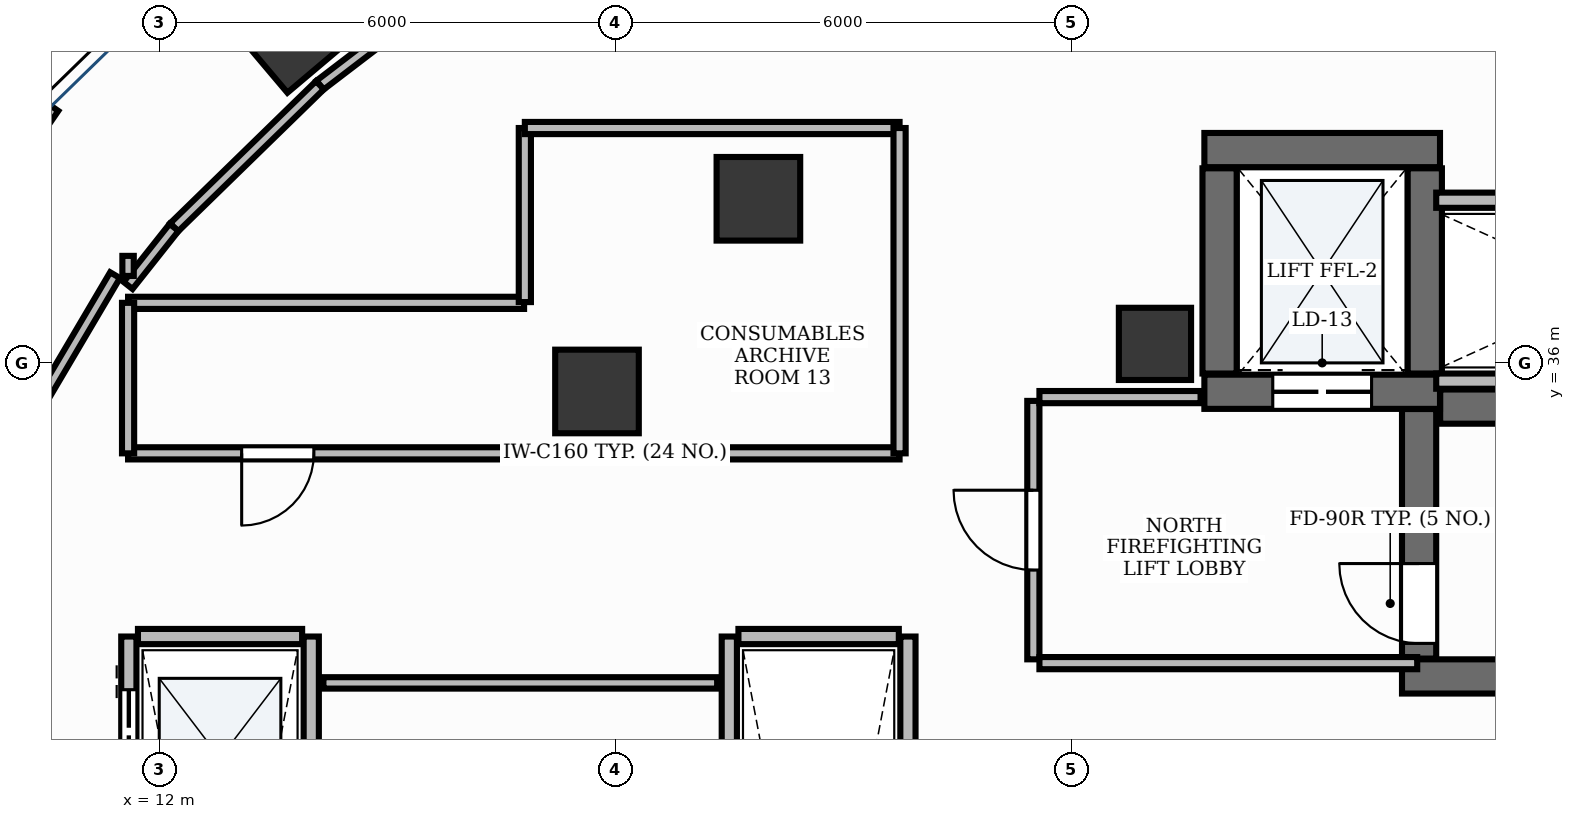
"""IFC4 building model, lengths in metres.
Left out: names, types, materials, properties, quantities, classifications, styles, units other than length and angle.
Written with IfcOpenShell. Run it as: python <this file> out.ifc"""

import sys

from ifc_helpers import new_model, si_unit, direction, frame, frame_2d, origin, origin_2d, place, context, subcontext, project, spatial, rectangle, extrude, element, fill, save


model = new_model("IFC4")
c1 = context("Model", 3, precision=1e-05, world=origin(), true_north=direction((0.0, 1.0)))
c2 = subcontext(c1, "Body", "Model", "MODEL_VIEW")
j1 = project(units=[si_unit("LENGTHUNIT", "METRE"), si_unit("PLANEANGLEUNIT", "RADIAN")], contexts=[c1])
p1 = place(None, origin())
s1 = spatial("IfcSite", under=j1, at=p1, CompositionType="ELEMENT")
p2 = place(p1, origin())
s2 = spatial("IfcBuilding", under=s1, at=p2, CompositionType="ELEMENT")
p3 = place(p2, frame((0.0, 0.0, 111.0)))
s3 = spatial("IfcBuildingStorey", under=s2, at=p3, CompositionType="ELEMENT", Elevation=111.0)
p4 = place(p3, frame((28.852, 35.425, 0.0), z_axis=(0.0, 0.0, 1.0), x_axis=(1.0, 0.0, 0.0)))
e1 = element("IfcWall", 1, at=p4, inside=s3, PredefinedType="SHEAR", context=c2, shape_type="SweptSolid", body=[
    extrude(rectangle(XDim=8.248, YDim=0.45, at=frame_2d((4.124, 0.0))), origin(), (0.0, 0.0, 1.0), 3.9),
])
p5 = place(p3, frame((28.35, 31.875, 0.0), z_axis=(0.0, 0.0, 1.0), x_axis=(1.0, 0.0, 0.0)))
e2 = element("IfcWall", 2, at=p5, inside=s3, PredefinedType="SHEAR", context=c2, shape_type="SweptSolid", body=[
    extrude(rectangle(XDim=8.75, YDim=0.45, at=frame_2d((4.375, 0.0))), origin(), (0.0, 0.0, 1.0), 3.9),
])
p6 = place(p3, frame((28.575, 32.11, 0.0), z_axis=(0.0, 0.0, 1.0), x_axis=(0.0, 1.0, 0.0)))
e3 = element("IfcWall", 3, at=p6, inside=s3, PredefinedType="SHEAR", context=c2, shape_type="SweptSolid", body=[
    extrude(rectangle(XDim=3.283, YDim=0.45, at=frame_2d((1.642, 0.0))), origin(), (0.0, 0.0, 1.0), 3.9),
])
p7 = place(p6, frame((0.2, 0.0, 0.0)))
e4 = element("IfcOpeningElement", 4, at=p7, cuts=e3, PredefinedType="OPENING", context=c2, shape_type="SweptSolid", body=[
    extrude(rectangle(XDim=1.05, YDim=2.15, at=frame_2d((0.525, 1.075))), frame((0.0, 0.24, 0.0), z_axis=(0.0, -1.0, 0.0), x_axis=(1.0, 0.0, 0.0)), (0.0, 0.0, 1.0), 0.48),
])
p8 = place(p3, frame((25.75, 38.8, 0.0), z_axis=(0.0, 0.0, 1.0), x_axis=(1.0, 0.0, 0.0)))
e5 = element("IfcWall", 5, at=p8, inside=s3, PredefinedType="SHEAR", context=c2, shape_type="SweptSolid", body=[
    extrude(rectangle(XDim=3.1, YDim=0.45, at=frame_2d((1.55, 0.0))), origin(), (0.0, 0.0, 1.0), 3.9),
])
p9 = place(p3, frame((25.75, 35.62, 0.0), z_axis=(0.0, 0.0, 1.0), x_axis=(1.0, 0.0, 0.0)))
e6 = element("IfcWall", 6, at=p9, inside=s3, PredefinedType="SHEAR", context=c2, shape_type="SweptSolid", body=[
    extrude(rectangle(XDim=3.1, YDim=0.45, at=frame_2d((1.55, 0.0))), origin(), (0.0, 0.0, 1.0), 3.9),
])
p10 = place(p9, frame((0.9, 0.0, 0.0)))
e7 = element("IfcOpeningElement", 7, at=p10, cuts=e6, PredefinedType="OPENING", context=c2, shape_type="SweptSolid", body=[
    extrude(rectangle(XDim=1.3, YDim=2.2, at=frame_2d((0.65, 1.1))), frame((0.0, 0.24, 0.0), z_axis=(0.0, -1.0, 0.0), x_axis=(1.0, 0.0, 0.0)), (0.0, 0.0, 1.0), 0.48),
])
for number, where, z_axis, x_axis in (
    (8, (25.95, 35.86, 0.0), (0.0, 0.0, 1.0), (0.0, 1.0, 0.0)),
    (9, (28.65, 35.86, 0.0), (0.0, 0.0, 1.0), (0.0, 1.0, 0.0)),
):
    element("IfcWall", number, at=place(p3, frame(where, z_axis=z_axis, x_axis=x_axis)), inside=s3, PredefinedType="SHEAR", context=c2, shape_type="SweptSolid", body=[
        extrude(rectangle(XDim=2.7, YDim=0.45, at=frame_2d((1.35, 0.0))), origin(), (0.0, 0.0, 1.0), 3.9),
    ])
p11 = place(p3, frame((25.1, 36.25, -0.0), z_axis=(0.0, 0.0, 1.0), x_axis=(1.0, 0.0, 0.0)))
e10 = element("IfcColumn", 10, at=p11, inside=s3, PredefinedType="PILASTER", context=c2, shape_type="SweptSolid", body=[
    extrude(rectangle(XDim=0.95, YDim=0.95, at=origin_2d()), origin(), (0.0, 0.0, 1.0), 3.901),
])
p12 = place(p3, frame((13.758, 40.4, -0.0), z_axis=(0.0, 0.0, 1.0), x_axis=(0.764246456939, 0.644924300253, 0.0)))
e11 = element("IfcColumn", 11, at=p12, inside=s3, PredefinedType="COLUMN", context=c2, shape_type="SweptSolid", body=[
    extrude(rectangle(XDim=1.2, YDim=1.2, at=origin_2d()), origin(), (0.0, 0.0, 1.0), 3.901),
])
for number, where, z_axis, x_axis in (
    (12, (19.883, 38.159, -0.0), (0.0, 0.0, 1.0), (1.0, 0.0, 0.0)),
    (13, (17.759, 35.624, -0.0), (0.0, 0.0, 1.0), (1.0, 0.0, 0.0)),
):
    element("IfcColumn", number, at=place(p3, frame(where, z_axis=z_axis, x_axis=x_axis)), inside=s3, PredefinedType="COLUMN", context=c2, shape_type="SweptSolid", body=[
        extrude(rectangle(XDim=1.1, YDim=1.1, at=origin_2d()), origin(), (0.0, 0.0, 1.0), 3.901),
    ])
p13 = place(p3, frame((10.548, 39.4, 0.0), z_axis=(0.0, 0.0, 1.0), x_axis=(-0.566825798999, -0.823837674296, 0.0)))
e14 = element("IfcWall", 14, at=p13, inside=s3, PredefinedType="STANDARD", context=c2, shape_type="SweptSolid", body=[
    extrude(rectangle(XDim=5.826, YDim=0.3, at=frame_2d((2.913, 0.0))), origin(), (0.0, 0.0, 1.0), 3.47),
])
p14 = place(p3, frame((11.6, 21.6, 0.0), z_axis=(0.0, 0.0, 1.0), x_axis=(0.0, 1.0, 0.0)))
e15 = element("IfcWall", 15, at=p14, inside=s3, PredefinedType="PARTITIONING", context=c2, shape_type="SweptSolid", body=[
    extrude(rectangle(XDim=10.8, YDim=0.2, at=frame_2d((5.4, 0.0))), origin(), (0.0, 0.0, 1.0), 2.91),
])
p15 = place(p14, frame((0.9, 0.0, 0.0)))
e16 = element("IfcOpeningElement", 16, at=p15, cuts=e15, PredefinedType="OPENING", context=c2, shape_type="SweptSolid", body=[
    extrude(rectangle(XDim=1.1, YDim=2.2, at=frame_2d((0.55, 1.1))), frame((0.0, 0.115, 0.0), z_axis=(0.0, -1.0, 0.0), x_axis=(1.0, 0.0, 0.0)), (0.0, 0.0, 1.0), 0.23),
])
p16 = place(p14, frame((3.6, 0.0, 0.0)))
e17 = element("IfcOpeningElement", 17, at=p16, cuts=e15, PredefinedType="OPENING", context=c2, shape_type="SweptSolid", body=[
    extrude(rectangle(XDim=1.1, YDim=2.2, at=frame_2d((0.55, 1.1))), frame((0.0, 0.115, 0.0), z_axis=(0.0, -1.0, 0.0), x_axis=(1.0, 0.0, 0.0)), (0.0, 0.0, 1.0), 0.23),
])
p17 = place(p14, frame((6.3, 0.0, 0.0)))
e18 = element("IfcOpeningElement", 18, at=p17, cuts=e15, PredefinedType="OPENING", context=c2, shape_type="SweptSolid", body=[
    extrude(rectangle(XDim=1.1, YDim=2.2, at=frame_2d((0.55, 1.1))), frame((0.0, 0.115, 0.0), z_axis=(0.0, -1.0, 0.0), x_axis=(1.0, 0.0, 0.0)), (0.0, 0.0, 1.0), 0.23),
])
p18 = place(p14, frame((9.0, 0.0, 0.0)))
e19 = element("IfcOpeningElement", 19, at=p18, cuts=e15, PredefinedType="OPENING", context=c2, shape_type="SweptSolid", body=[
    extrude(rectangle(XDim=1.1, YDim=2.2, at=frame_2d((0.55, 1.1))), frame((0.0, 0.115, 0.0), z_axis=(0.0, -1.0, 0.0), x_axis=(1.0, 0.0, 0.0)), (0.0, 0.0, 1.0), 0.23),
])
p19 = place(p3, frame((14.0, 21.6, 0.0), z_axis=(0.0, 0.0, 1.0), x_axis=(0.0, 1.0, 0.0)))
e20 = element("IfcWall", 20, at=p19, inside=s3, PredefinedType="PARTITIONING", context=c2, shape_type="SweptSolid", body=[
    extrude(rectangle(XDim=10.8, YDim=0.2, at=frame_2d((5.4, 0.0))), origin(), (0.0, 0.0, 1.0), 2.91),
])
p20 = place(p3, frame((11.72, 32.4, 0.0), z_axis=(0.0, 0.0, 1.0), x_axis=(1.0, 0.0, 0.0)))
e21 = element("IfcWall", 21, at=p20, inside=s3, PredefinedType="PARTITIONING", context=c2, shape_type="SweptSolid", body=[
    extrude(rectangle(XDim=2.16, YDim=0.2, at=frame_2d((1.08, 0.0))), origin(), (0.0, 0.0, 1.0), 2.91),
])
for number, where, z_axis, x_axis in (
    (22, (19.5, 21.6, 0.0), (0.0, 0.0, 1.0), (0.0, 1.0, 0.0)),
    (23, (21.85, 21.6, 0.0), (0.0, 0.0, 1.0), (0.0, 1.0, 0.0)),
):
    element("IfcWall", number, at=place(p3, frame(where, z_axis=z_axis, x_axis=x_axis)), inside=s3, PredefinedType="PARTITIONING", context=c2, shape_type="SweptSolid", body=[
        extrude(rectangle(XDim=10.8, YDim=0.2, at=frame_2d((5.4, 0.0))), origin(), (0.0, 0.0, 1.0), 2.91),
    ])
p21 = place(p3, frame((19.62, 32.4, 0.0), z_axis=(0.0, 0.0, 1.0), x_axis=(1.0, 0.0, 0.0)))
e24 = element("IfcWall", 24, at=p21, inside=s3, PredefinedType="PARTITIONING", context=c2, shape_type="SweptSolid", body=[
    extrude(rectangle(XDim=2.11, YDim=0.2, at=frame_2d((1.055, 0.0))), origin(), (0.0, 0.0, 1.0), 2.91),
])
for number, where, z_axis, x_axis in (
    (25, (28.8, 35.76, 0.0), (0.0, 0.0, 1.0), (1.0, 0.0, 0.0)),
    (26, (28.8, 38.14, 0.0), (0.0, 0.0, 1.0), (1.0, 0.0, 0.0)),
):
    element("IfcWall", number, at=place(p3, frame(where, z_axis=z_axis, x_axis=x_axis)), inside=s3, PredefinedType="PARTITIONING", context=c2, shape_type="SweptSolid", body=[
        extrude(rectangle(XDim=4.57, YDim=0.2, at=frame_2d((2.285, 0.0))), origin(), (0.0, 0.0, 1.0), 2.91),
    ])
p22 = place(p3, frame((23.5, 32.1, 0.0), z_axis=(0.0, 0.0, 1.0), x_axis=(0.0, 1.0, 0.0)))
e27 = element("IfcWall", 27, at=p22, inside=s3, PredefinedType="PARTITIONING", context=c2, shape_type="SweptSolid", body=[
    extrude(rectangle(XDim=3.4, YDim=0.16, at=frame_2d((1.7, 0.0))), origin(), (0.0, 0.0, 1.0), 2.91),
])
p23 = place(p22, frame((1.175, 0.0, 0.0)))
e28 = element("IfcOpeningElement", 28, at=p23, cuts=e27, PredefinedType="OPENING", context=c2, shape_type="SweptSolid", body=[
    extrude(rectangle(XDim=1.05, YDim=2.15, at=frame_2d((0.525, 1.075))), frame((0.0, 0.095, 0.0), z_axis=(0.0, -1.0, 0.0), x_axis=(1.0, 0.0, 0.0)), (0.0, 0.0, 1.0), 0.19),
])
p24 = place(p3, frame((23.58, 32.05, 0.0), z_axis=(0.0, 0.0, 1.0), x_axis=(1.0, 0.0, 0.0)))
e29 = element("IfcWall", 29, at=p24, inside=s3, PredefinedType="PARTITIONING", context=c2, shape_type="SweptSolid", body=[
    extrude(rectangle(XDim=4.97, YDim=0.16, at=frame_2d((2.485, 0.0))), origin(), (0.0, 0.0, 1.0), 2.91),
])
p25 = place(p3, frame((23.58, 35.55, 0.0), z_axis=(0.0, 0.0, 1.0), x_axis=(1.0, 0.0, 0.0)))
e30 = element("IfcWall", 30, at=p25, inside=s3, PredefinedType="PARTITIONING", context=c2, shape_type="SweptSolid", body=[
    extrude(rectangle(XDim=2.12, YDim=0.16, at=frame_2d((1.06, 0.0))), origin(), (0.0, 0.0, 1.0), 2.91),
])
p26 = place(p3, frame((21.74, 34.81, 0.0), z_axis=(0.0, 0.0, 1.0), x_axis=(-1.0, 0.0, 0.0)))
e31 = element("IfcWall", 31, at=p26, inside=s3, PredefinedType="PARTITIONING", context=c2, shape_type="SweptSolid", body=[
    extrude(rectangle(XDim=10.15, YDim=0.16, at=frame_2d((5.075, 0.0))), origin(), (0.0, 0.0, 1.0), 2.91),
])
p27 = place(p26, frame((7.705, 0.0, 0.0)))
e32 = element("IfcOpeningElement", 32, at=p27, cuts=e31, PredefinedType="OPENING", context=c2, shape_type="SweptSolid", body=[
    extrude(rectangle(XDim=0.95, YDim=2.15, at=frame_2d((0.475, 1.075))), frame((0.0, 0.095, 0.0), z_axis=(0.0, -1.0, 0.0), x_axis=(1.0, 0.0, 0.0)), (0.0, 0.0, 1.0), 0.19),
])
p28 = place(p3, frame((11.59, 36.79, 0.0), z_axis=(0.0, 0.0, 1.0), x_axis=(1.0, 0.0, 0.0)))
e33 = element("IfcWall", 33, at=p28, inside=s3, PredefinedType="PARTITIONING", context=c2, shape_type="SweptSolid", body=[
    extrude(rectangle(XDim=5.21, YDim=0.16, at=frame_2d((2.605, 0.0))), origin(), (0.0, 0.0, 1.0), 2.91),
])
p29 = place(p3, frame((16.81, 36.8, 0.0), z_axis=(0.0, 0.0, 1.0), x_axis=(0.0, 1.0, 0.0)))
e34 = element("IfcWall", 34, at=p29, inside=s3, PredefinedType="PARTITIONING", context=c2, shape_type="SweptSolid", body=[
    extrude(rectangle(XDim=2.29, YDim=0.16, at=frame_2d((1.145, 0.0))), origin(), (0.0, 0.0, 1.0), 2.91),
])
p30 = place(p3, frame((16.81, 39.09, 0.0), z_axis=(0.0, 0.0, 1.0), x_axis=(1.0, 0.0, 0.0)))
e35 = element("IfcWall", 35, at=p30, inside=s3, PredefinedType="PARTITIONING", context=c2, shape_type="SweptSolid", body=[
    extrude(rectangle(XDim=4.93, YDim=0.16, at=frame_2d((2.465, 0.0))), origin(), (0.0, 0.0, 1.0), 2.91),
])
p31 = place(p3, frame((21.74, 39.09, 0.0), z_axis=(0.0, 0.0, 1.0), x_axis=(0.0, -1.0, 0.0)))
e36 = element("IfcWall", 36, at=p31, inside=s3, PredefinedType="PARTITIONING", context=c2, shape_type="SweptSolid", body=[
    extrude(rectangle(XDim=4.28, YDim=0.16, at=frame_2d((2.14, 0.0))), origin(), (0.0, 0.0, 1.0), 2.91),
])
p32 = place(p3, frame((11.59, 34.81, 0.0), z_axis=(0.0, 0.0, 1.0), x_axis=(0.0, 1.0, 0.0)))
e37 = element("IfcWall", 37, at=p32, inside=s3, PredefinedType="PARTITIONING", context=c2, shape_type="SweptSolid", body=[
    extrude(rectangle(XDim=1.98, YDim=0.16, at=frame_2d((0.99, 0.0))), origin(), (0.0, 0.0, 1.0), 2.91),
])
p33 = place(p3, frame((16.339, 41.354, 0.0), z_axis=(0.0, 0.0, 1.0), x_axis=(-0.794513779695, -0.607246122981, 0.0)))
e38 = element("IfcWall", 38, at=p33, inside=s3, PredefinedType="PARTITIONING", context=c2, shape_type="SweptSolid", body=[
    extrude(rectangle(XDim=2.799, YDim=0.15, at=frame_2d((1.399, 0.0))), origin(), (0.0, 0.0, 1.0), 2.91),
])
p34 = place(p3, frame((14.114, 39.653, 0.0), z_axis=(0.0, 0.0, 1.0), x_axis=(-0.716161838398, -0.697934252794, 0.0)))
e39 = element("IfcWall", 39, at=p34, inside=s3, PredefinedType="PARTITIONING", context=c2, shape_type="SweptSolid", body=[
    extrude(rectangle(XDim=2.679, YDim=0.15, at=frame_2d((1.339, 0.0))), origin(), (0.0, 0.0, 1.0), 2.91),
])
p35 = place(p3, frame((12.195, 37.782, 0.0), z_axis=(0.0, 0.0, 1.0), x_axis=(-0.621081637991, -0.783745876513, 0.0)))
e40 = element("IfcWall", 40, at=p35, inside=s3, PredefinedType="PARTITIONING", context=c2, shape_type="SweptSolid", body=[
    extrude(rectangle(XDim=0.974, YDim=0.15, at=frame_2d((0.487, 0.0))), origin(), (0.0, 0.0, 1.0), 2.91),
])
p36 = place(p3, frame((11.59, 37.144, 0.0), z_axis=(0.0, 0.0, 1.0), x_axis=(0.0, 1.0, 0.0)))
e41 = element("IfcWall", 41, at=p36, inside=s3, PredefinedType="PARTITIONING", context=c2, shape_type="SweptSolid", body=[
    extrude(rectangle(XDim=0.264, YDim=0.15, at=frame_2d((0.132, 0.0))), origin(), (0.0, 0.0, 1.0), 2.91),
])
p37 = place(p3, frame((11.419, 37.154, 0.0), z_axis=(0.0, 0.0, 1.0), x_axis=(-0.508183269016, -0.861248956511, 0.0)))
e42 = element("IfcWall", 42, at=p37, inside=s3, PredefinedType="PARTITIONING", context=c2, shape_type="SweptSolid", body=[
    extrude(rectangle(XDim=4.053, YDim=0.15, at=frame_2d((2.026, 0.0))), origin(), (0.0, 0.0, 1.0), 2.91),
])
p38 = place(p3, frame((14.16, 31.79, 0.0), z_axis=(0.0, 0.0, 1.0), x_axis=(1.0, 0.0, 0.0)))
e43 = element("IfcWall", 43, at=p38, inside=s3, PredefinedType="PARTITIONING", context=c2, shape_type="SweptSolid", body=[
    extrude(rectangle(XDim=5.18, YDim=0.15, at=frame_2d((2.59, 0.0))), origin(), (0.0, 0.0, 1.0), 2.91),
])
p39 = place(p7, origin())
e44 = element("IfcDoor", 44, at=p39, inside=s3, OperationType="SINGLE_SWING_RIGHT", PredefinedType="DOOR", context=c2, shape_type="SweptSolid", body=[
    extrude(rectangle(XDim=1.05, YDim=2.15, at=frame_2d((0.525, 1.075))), frame((0.0, 0.025, 0.0), z_axis=(0.0, -1.0, 0.0), x_axis=(1.0, 0.0, 0.0)), (0.0, 0.0, 1.0), 0.05),
])
fill(e4, e44)
p40 = place(p18, origin())
e45 = element("IfcDoor", 45, at=p40, inside=s3, OperationType="DOUBLE_DOOR_SLIDING", PredefinedType="DOOR", context=c2, shape_type="SweptSolid", body=[
    extrude(rectangle(XDim=1.1, YDim=2.2, at=frame_2d((0.55, 1.1))), frame((0.0, 0.025, 0.0), z_axis=(0.0, -1.0, 0.0), x_axis=(1.0, 0.0, 0.0)), (0.0, 0.0, 1.0), 0.05),
])
fill(e19, e45)
p41 = place(p10, origin())
e46 = element("IfcDoor", 46, at=p41, inside=s3, OperationType="DOUBLE_DOOR_SLIDING", PredefinedType="DOOR", context=c2, shape_type="SweptSolid", body=[
    extrude(rectangle(XDim=1.3, YDim=2.2, at=frame_2d((0.65, 1.1))), frame((0.0, 0.025, 0.0), z_axis=(0.0, -1.0, 0.0), x_axis=(1.0, 0.0, 0.0)), (0.0, 0.0, 1.0), 0.05),
])
fill(e7, e46)
p42 = place(p23, origin())
e47 = element("IfcDoor", 47, at=p42, inside=s3, OperationType="SINGLE_SWING_RIGHT", PredefinedType="DOOR", context=c2, shape_type="SweptSolid", body=[
    extrude(rectangle(XDim=1.05, YDim=2.15, at=frame_2d((0.525, 1.075))), frame((0.0, 0.025, 0.0), z_axis=(0.0, -1.0, 0.0), x_axis=(1.0, 0.0, 0.0)), (0.0, 0.0, 1.0), 0.05),
])
fill(e28, e47)
p43 = place(p27, origin())
e48 = element("IfcDoor", 48, at=p43, inside=s3, OperationType="SINGLE_SWING_RIGHT", PredefinedType="DOOR", context=c2, shape_type="SweptSolid", body=[
    extrude(rectangle(XDim=0.95, YDim=2.15, at=frame_2d((0.475, 1.075))), frame((0.0, 0.025, 0.0), z_axis=(0.0, -1.0, 0.0), x_axis=(1.0, 0.0, 0.0)), (0.0, 0.0, 1.0), 0.05),
])
fill(e32, e48)
save(model, sys.argv[1])
